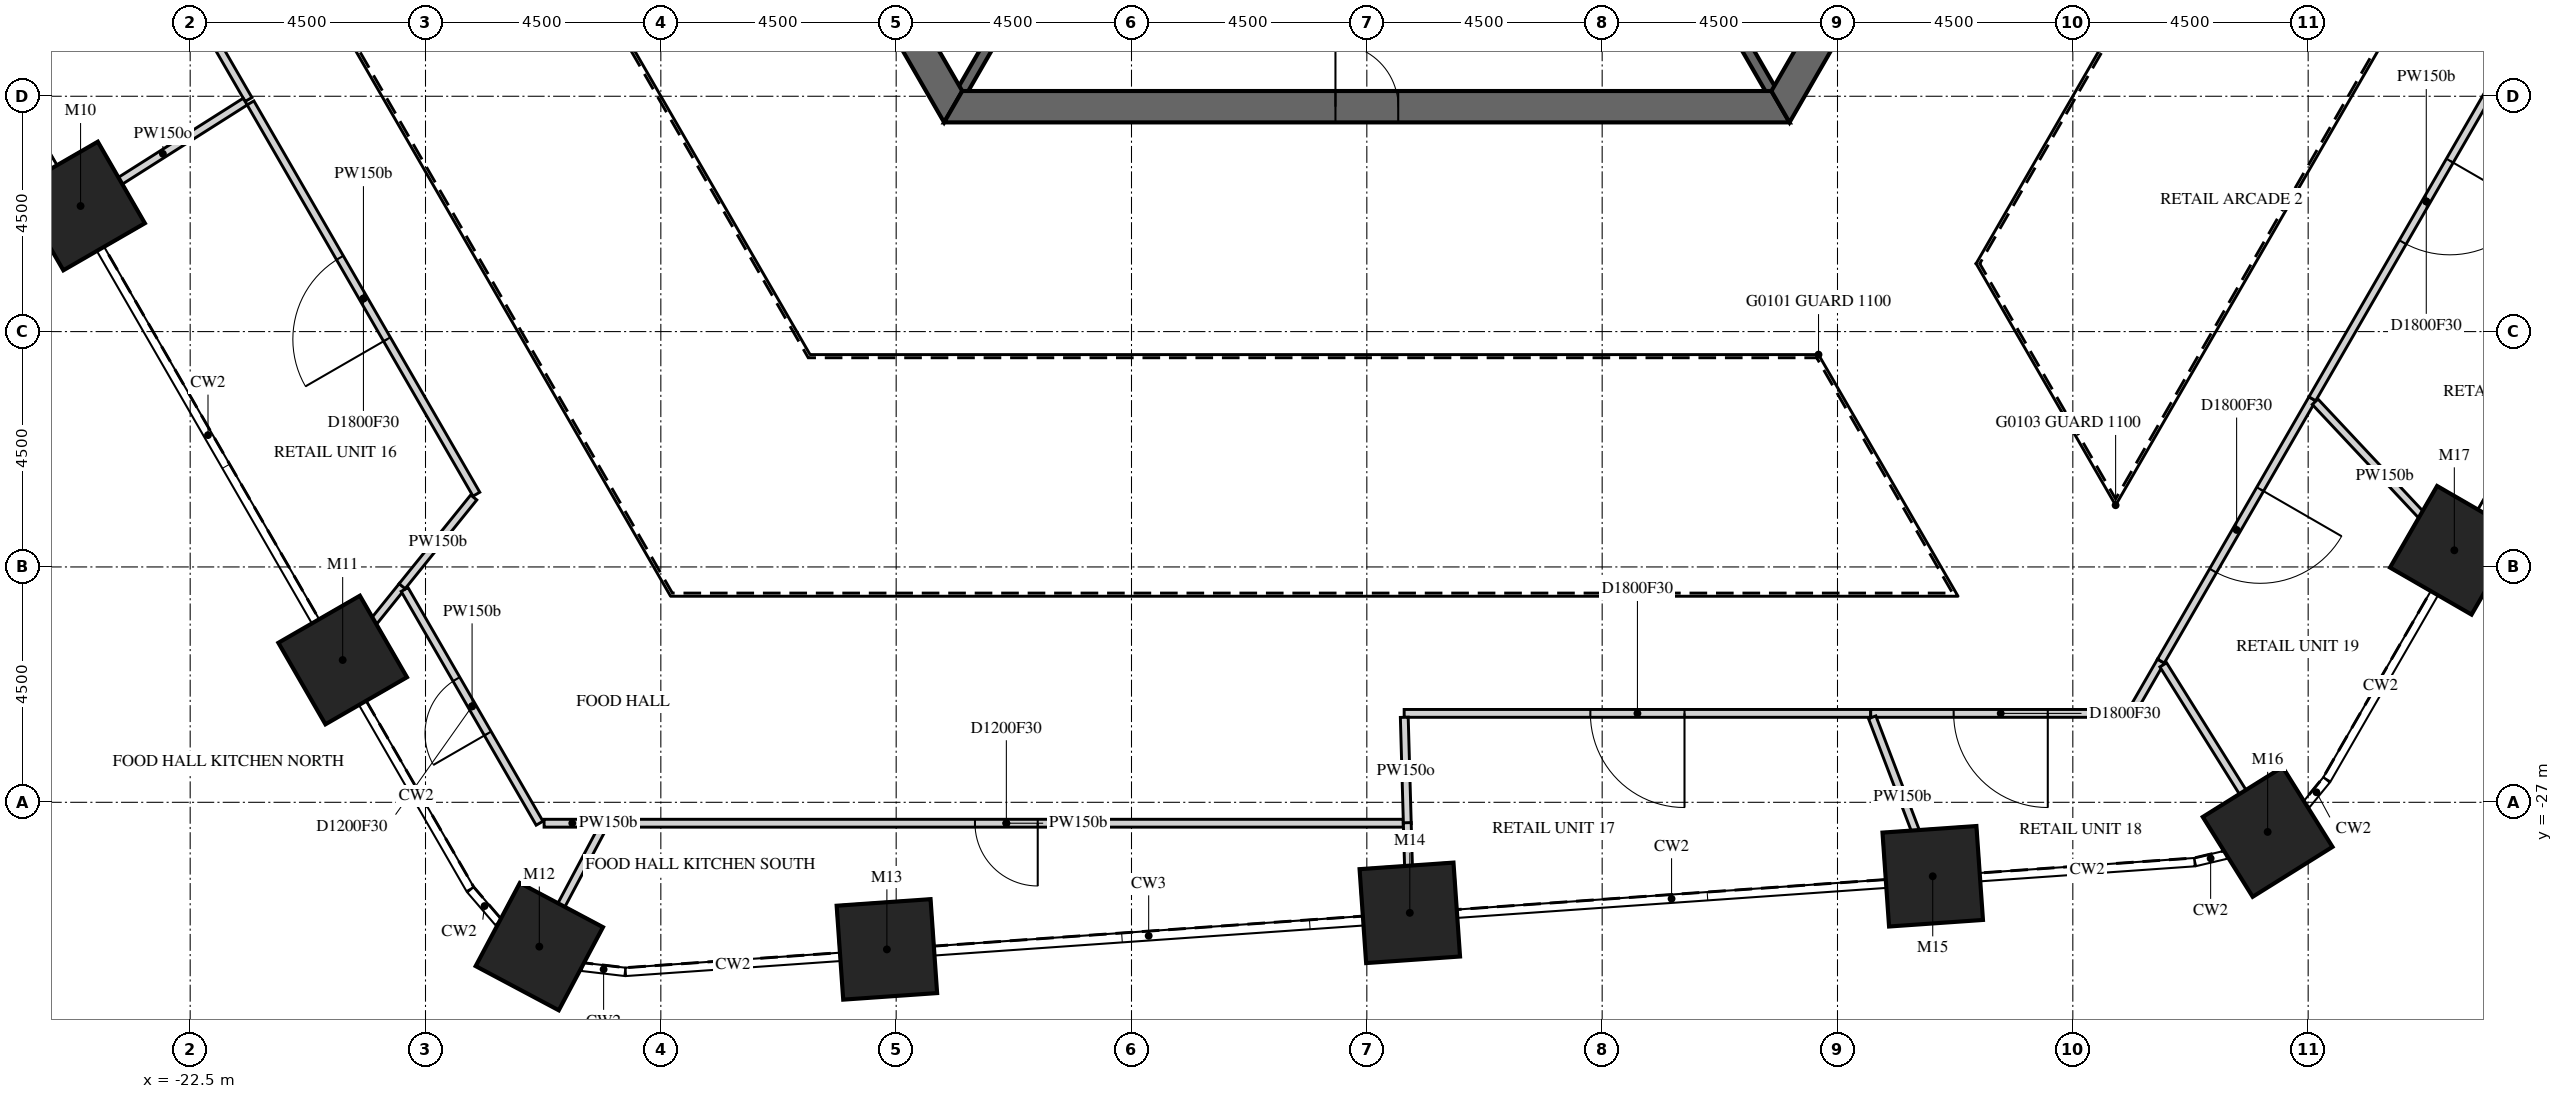
"""IFC4 building model, lengths in metres.
Left out: names, types, materials, properties, quantities, classifications, styles, units other than length and angle.
Written with IfcOpenShell. Run it as: python <this file> out.ifc"""

import sys

from ifc_helpers import new_model, si_unit, direction, frame, frame_2d, origin, origin_2d, place, context, subcontext, project, spatial, polyline, rectangle, outline, extrude, element, fill, save


model = new_model("IFC4")
c1 = context("Model", 3, precision=1e-05, world=origin(), true_north=direction((0.0, 1.0)))
c2 = subcontext(c1, "Body", "Model", "MODEL_VIEW")
j1 = project(units=[si_unit("LENGTHUNIT", "METRE"), si_unit("PLANEANGLEUNIT", "RADIAN")], contexts=[c1])
p1 = place(None, origin())
s1 = spatial("IfcSite", under=j1, at=p1, CompositionType="ELEMENT")
p2 = place(p1, origin())
s2 = spatial("IfcBuilding", under=s1, at=p2, CompositionType="ELEMENT")
p3 = place(p2, frame((0.0, 0.0, 9.0)))
s3 = spatial("IfcBuildingStorey", under=s2, at=p3, CompositionType="ELEMENT", Elevation=9.0)
for number, where, z_axis, x_axis in (
    (1, (-24.596, -15.599, -0.25), (0.0, 0.0, 1.0), (-0.5, 0.866, 0.0)),
    (2, (-19.584, -24.28, -0.25), (0.0, 0.0, 1.0), (-0.5, 0.866, 0.0)),
    (3, (-15.823, -29.76, -0.25), (0.0, 0.0, 1.0), (-0.883, 0.469, 0.0)),
    (4, (-9.177, -29.813, -0.25), (0.0, 0.0, 1.0), (-0.998, -0.07, 0.0)),
    (5, (0.822, -29.114, -0.25), (0.0, 0.0, 1.0), (-0.998, -0.07, 0.0)),
    (6, (10.821, -28.414, -0.25), (0.0, 0.0, 1.0), (-0.998, -0.07, 0.0)),
    (7, (17.225, -27.566, -0.25), (0.0, 0.0, 1.0), (-0.848, -0.53, 0.0)),
    (8, (20.795, -22.182, -0.25), (0.0, 0.0, 1.0), (-0.5, -0.866, 0.0)),
):
    element("IfcColumn", number, at=place(p3, frame(where, z_axis=z_axis, x_axis=x_axis)), inside=s3, PredefinedType="COLUMN", context=c2, shape_type="SweptSolid", body=[
        extrude(rectangle(XDim=1.8, YDim=1.8, at=origin_2d()), origin(), (0.0, 0.0, 1.0), 6.0),
    ])
p4 = place(p3, frame((-15.819, 0.0, -0.25), z_axis=(0.0, 0.0, 1.0), x_axis=(0.499999880136, -0.866025472988, 0.0)))
e9 = element("IfcWall", 9, at=p4, inside=s3, PredefinedType="SHEAR", context=c2, shape_type="SweptSolid", body=[
    extrude(outline(polyline([(-0.173, -0.3), (15.993, -0.3), (15.646, 0.3), (0.173, 0.3), (-0.173, -0.3)])), origin(), (0.0, 0.0, 1.0), 6.0),
])
p5 = place(p4, frame((6.981, 0.0, 0.25)))
e10 = element("IfcOpeningElement", 10, at=p5, cuts=e9, PredefinedType="OPENING", context=c2, shape_type="SweptSolid", body=[
    extrude(rectangle(XDim=1.8, YDim=2.4, at=frame_2d((0.9, 1.2))), frame((0.0, 0.31, 0.0), z_axis=(0.0, -1.0, 0.0), x_axis=(1.0, 0.0, 0.0)), (0.0, 0.0, 1.0), 0.62),
])
p6 = place(p3, frame((-7.91, -13.7, -0.25), z_axis=(0.0, 0.0, 1.0), x_axis=(1.0, 0.0, 0.0)))
e11 = element("IfcWall", 11, at=p6, inside=s3, PredefinedType="SHEAR", context=c2, shape_type="SweptSolid", body=[
    extrude(outline(polyline([(-0.173, -0.3), (15.993, -0.3), (15.646, 0.3), (0.173, 0.3), (-0.173, -0.3)])), origin(), (0.0, 0.0, 1.0), 6.0),
])
p7 = place(p6, frame((7.31, 0.0, 0.25)))
e12 = element("IfcOpeningElement", 12, at=p7, cuts=e11, PredefinedType="OPENING", context=c2, shape_type="SweptSolid", body=[
    extrude(rectangle(XDim=1.2, YDim=2.4, at=frame_2d((0.6, 1.2))), frame((0.0, 0.31, 0.0), z_axis=(0.0, -1.0, 0.0), x_axis=(1.0, 0.0, 0.0)), (0.0, 0.0, 1.0), 0.62),
])
p8 = place(p3, frame((7.91, -13.7, -0.25), z_axis=(0.0, 0.0, 1.0), x_axis=(0.499999880136, 0.866025472988, 0.0)))
e13 = element("IfcWall", 13, at=p8, inside=s3, PredefinedType="SHEAR", context=c2, shape_type="SweptSolid", body=[
    extrude(outline(polyline([(-0.173, -0.3), (15.993, -0.3), (15.646, 0.3), (0.173, 0.3), (-0.173, -0.3)])), origin(), (0.0, 0.0, 1.0), 6.0),
])
p9 = place(p8, frame((7.039, 0.0, 0.25)))
e14 = element("IfcOpeningElement", 14, at=p9, cuts=e13, PredefinedType="OPENING", context=c2, shape_type="SweptSolid", body=[
    extrude(rectangle(XDim=1.8, YDim=2.4, at=frame_2d((0.9, 1.2))), frame((0.0, 0.31, 0.0), z_axis=(0.0, -1.0, 0.0), x_axis=(1.0, 0.0, 0.0)), (0.0, 0.0, 1.0), 0.62),
])
for number, where, z_axis, x_axis in (
    (15, (-5.773, -10.0, -0.25), (0.0, 0.0, 1.0), (-0.5, -0.866, 0.0)),
    (16, (5.773, -10.0, -0.25), (0.0, 0.0, 1.0), (0.5, -0.866, 0.0)),
):
    element("IfcWall", number, at=place(p3, frame(where, z_axis=z_axis, x_axis=x_axis)), inside=s3, PredefinedType="SHEAR", context=c2, shape_type="SweptSolid", body=[
        extrude(rectangle(XDim=3.926, YDim=0.2, at=frame_2d((1.963, 0.0))), origin(), (0.0, 0.0, 1.0), 6.0),
    ])
p10 = place(p3, frame((-21.384, -13.562, 0.0), z_axis=(0.0, 0.0, 1.0), x_axis=(-0.499976136806, 0.866039180768, 0.0)))
e17 = element("IfcWall", 17, at=p10, inside=s3, PredefinedType="PARTITIONING", context=c2, shape_type="SweptSolid", body=[
    extrude(rectangle(XDim=8.636, YDim=0.15, at=frame_2d((4.318, 0.0))), origin(), (0.0, 0.0, 1.0), 5.75),
])
p11 = place(p10, frame((3.418, 0.0, 0.0)))
e18 = element("IfcOpeningElement", 18, at=p11, cuts=e17, PredefinedType="OPENING", context=c2, shape_type="SweptSolid", body=[
    extrude(rectangle(XDim=1.8, YDim=2.1, at=frame_2d((0.9, 1.05))), frame((0.0, 0.085, 0.0), z_axis=(0.0, -1.0, 0.0), x_axis=(1.0, 0.0, 0.0)), (0.0, 0.0, 1.0), 0.17),
])
p12 = place(p3, frame((-24.596, -15.599, 0.0), z_axis=(0.0, 0.0, 1.0), x_axis=(0.84447751604, 0.535591005249, 0.0)))
e19 = element("IfcWall", 19, at=p12, inside=s3, PredefinedType="PARTITIONING", context=c2, shape_type="SweptSolid", body=[
    extrude(rectangle(XDim=3.728, YDim=0.15, at=frame_2d((1.864, 0.0))), origin(), (0.0, 0.0, 1.0), 4.996),
])
p13 = place(p3, frame((-17.027, -21.109, 0.0), z_axis=(0.0, 0.0, 1.0), x_axis=(-0.499968708895, 0.866043468958, 0.0)))
e20 = element("IfcWall", 20, at=p13, inside=s3, PredefinedType="PARTITIONING", context=c2, shape_type="SweptSolid", body=[
    extrude(rectangle(XDim=8.639, YDim=0.15, at=frame_2d((4.32, 0.0))), origin(), (0.0, 0.0, 1.0), 5.75),
])
p14 = place(p13, frame((3.42, 0.0, 0.0)))
e21 = element("IfcOpeningElement", 21, at=p14, cuts=e20, PredefinedType="OPENING", context=c2, shape_type="SweptSolid", body=[
    extrude(rectangle(XDim=1.8, YDim=2.1, at=frame_2d((0.9, 1.05))), frame((0.0, 0.085, 0.0), z_axis=(0.0, -1.0, 0.0), x_axis=(1.0, 0.0, 0.0)), (0.0, 0.0, 1.0), 0.17),
])
p15 = place(p3, frame((-19.584, -24.28, 0.0), z_axis=(0.0, 0.0, 1.0), x_axis=(0.627663432336, 0.778484820474, 0.0)))
e22 = element("IfcWall", 22, at=p15, inside=s3, PredefinedType="PARTITIONING", context=c2, shape_type="SweptSolid", body=[
    extrude(rectangle(XDim=1.823, YDim=0.15, at=frame_2d((0.911, 0.0))), origin(), (0.0, 0.0, 1.0), 5.75),
])
p16 = place(p3, frame((-15.819, -27.4, 0.0), z_axis=(0.0, 0.0, 1.0), x_axis=(-0.500071878781, 0.865983900574, 0.0)))
e23 = element("IfcWall", 23, at=p16, inside=s3, PredefinedType="PARTITIONING", context=c2, shape_type="SweptSolid", body=[
    extrude(rectangle(XDim=5.161, YDim=0.15, at=frame_2d((2.581, 0.0))), origin(), (0.0, 0.0, 1.0), 5.75),
])
p17 = place(p16, frame((1.98, 0.0, 0.0)))
e24 = element("IfcOpeningElement", 24, at=p17, cuts=e23, PredefinedType="OPENING", context=c2, shape_type="SweptSolid", body=[
    extrude(rectangle(XDim=1.2, YDim=2.1, at=frame_2d((0.6, 1.05))), frame((0.0, 0.085, 0.0), z_axis=(0.0, -1.0, 0.0), x_axis=(1.0, 0.0, 0.0)), (0.0, 0.0, 1.0), 0.17),
])
p18 = place(p3, frame((-17.077, -21.172, 0.0), z_axis=(0.0, 0.0, 1.0), x_axis=(-0.627993102959, -0.778218904059, 0.0)))
e25 = element("IfcWall", 25, at=p18, inside=s3, PredefinedType="PARTITIONING", context=c2, shape_type="SweptSolid", body=[
    extrude(rectangle(XDim=2.181, YDim=0.15, at=frame_2d((1.09, 0.0))), origin(), (0.0, 0.0, 1.0), 5.75),
])
p19 = place(p3, frame((-15.824, -29.76, 0.0), z_axis=(0.0, 0.0, 1.0), x_axis=(0.469469065188, 0.882948920851, 0.0)))
e26 = element("IfcWall", 26, at=p19, inside=s3, PredefinedType="PARTITIONING", context=c2, shape_type="SweptSolid", body=[
    extrude(rectangle(XDim=2.673, YDim=0.15, at=frame_2d((1.336, 0.0))), origin(), (0.0, 0.0, 1.0), 4.988),
])
p20 = place(p3, frame((-15.732, -27.4, 0.0), z_axis=(0.0, 0.0, 1.0), x_axis=(1.0, 0.0, 0.0)))
e27 = element("IfcWall", 27, at=p20, inside=s3, PredefinedType="PARTITIONING", context=c2, shape_type="SweptSolid", body=[
    extrude(rectangle(XDim=1.078, YDim=0.15, at=frame_2d((0.539, 0.0))), origin(), (0.0, 0.0, 1.0), 5.75),
])
p21 = place(p3, frame((0.698, -27.4, 0.0), z_axis=(0.0, 0.0, 1.0), x_axis=(-1.0, 0.0, 0.0)))
e28 = element("IfcWall", 28, at=p21, inside=s3, PredefinedType="PARTITIONING", context=c2, shape_type="SweptSolid", body=[
    extrude(rectangle(XDim=15.182, YDim=0.15, at=frame_2d((7.591, 0.0))), origin(), (0.0, 0.0, 1.0), 5.75),
])
p22 = place(p21, frame((6.991, 0.0, 0.0)))
e29 = element("IfcOpeningElement", 29, at=p22, cuts=e28, PredefinedType="OPENING", context=c2, shape_type="SweptSolid", body=[
    extrude(rectangle(XDim=1.2, YDim=2.1, at=frame_2d((0.6, 1.05))), frame((0.0, 0.085, 0.0), z_axis=(0.0, -1.0, 0.0), x_axis=(1.0, 0.0, 0.0)), (0.0, 0.0, 1.0), 0.17),
])
p23 = place(p3, frame((9.635, -25.3, 0.0), z_axis=(0.0, 0.0, 1.0), x_axis=(-1.0, 0.0, 0.0)))
e30 = element("IfcWall", 30, at=p23, inside=s3, PredefinedType="PARTITIONING", context=c2, shape_type="SweptSolid", body=[
    extrude(rectangle(XDim=8.921, YDim=0.15, at=frame_2d((4.46, 0.0))), origin(), (0.0, 0.0, 1.0), 5.75),
])
p24 = place(p23, frame((3.561, 0.0, 0.0)))
e31 = element("IfcOpeningElement", 31, at=p24, cuts=e30, PredefinedType="OPENING", context=c2, shape_type="SweptSolid", body=[
    extrude(rectangle(XDim=1.8, YDim=2.1, at=frame_2d((0.9, 1.05))), frame((0.0, 0.085, 0.0), z_axis=(0.0, -1.0, 0.0), x_axis=(1.0, 0.0, 0.0)), (0.0, 0.0, 1.0), 0.17),
])
p25 = place(p3, frame((0.774, -27.41, 0.0), z_axis=(0.0, 0.0, 1.0), x_axis=(-0.028422825387, 0.999595989886, 0.0)))
e32 = element("IfcWall", 32, at=p25, inside=s3, PredefinedType="PARTITIONING", context=c2, shape_type="SweptSolid", body=[
    extrude(rectangle(XDim=2.036, YDim=0.15, at=frame_2d((1.018, 0.0))), origin(), (0.0, 0.0, 1.0), 4.996),
])
p26 = place(p3, frame((0.822, -29.114, 0.0), z_axis=(0.0, 0.0, 1.0), x_axis=(-0.028450670454, 0.999595197743, 0.0)))
e33 = element("IfcWall", 33, at=p26, inside=s3, PredefinedType="PARTITIONING", context=c2, shape_type="SweptSolid", body=[
    extrude(rectangle(XDim=1.725, YDim=0.15, at=frame_2d((0.862, 0.0))), origin(), (0.0, 0.0, 1.0), 4.996),
])
p27 = place(p3, frame((14.607, -25.3, 0.0), z_axis=(0.0, 0.0, 1.0), x_axis=(-1.0, 0.0, 0.0)))
e34 = element("IfcWall", 34, at=p27, inside=s3, PredefinedType="PARTITIONING", context=c2, shape_type="SweptSolid", body=[
    extrude(rectangle(XDim=4.972, YDim=0.15, at=frame_2d((2.486, 0.0))), origin(), (0.0, 0.0, 1.0), 5.75),
])
p28 = place(p27, frame((1.586, 0.0, 0.0)))
e35 = element("IfcOpeningElement", 35, at=p28, cuts=e34, PredefinedType="OPENING", context=c2, shape_type="SweptSolid", body=[
    extrude(rectangle(XDim=1.8, YDim=2.1, at=frame_2d((0.9, 1.05))), frame((0.0, 0.085, 0.0), z_axis=(0.0, -1.0, 0.0), x_axis=(1.0, 0.0, 0.0)), (0.0, 0.0, 1.0), 0.17),
])
p29 = place(p3, frame((10.821, -28.414, 0.0), z_axis=(0.0, 0.0, 1.0), x_axis=(-0.355923523558, 0.934515085688, 0.0)))
e36 = element("IfcWall", 36, at=p29, inside=s3, PredefinedType="PARTITIONING", context=c2, shape_type="SweptSolid", body=[
    extrude(rectangle(XDim=3.252, YDim=0.15, at=frame_2d((1.626, 0.0))), origin(), (0.0, 0.0, 1.0), 5.75),
])
p30 = place(p3, frame((14.65, -25.225, 0.0), z_axis=(0.0, 0.0, 1.0), x_axis=(0.49972905027, 0.86618178018, 0.0)))
e37 = element("IfcWall", 37, at=p30, inside=s3, PredefinedType="PARTITIONING", context=c2, shape_type="SweptSolid", body=[
    extrude(rectangle(XDim=1.068, YDim=0.15, at=frame_2d((0.534, 0.0))), origin(), (0.0, 0.0, 1.0), 5.75),
])
p31 = place(p3, frame((18.08, -19.285, 0.0), z_axis=(0.0, 0.0, 1.0), x_axis=(-0.500065471556, -0.865987600464, 0.0)))
e38 = element("IfcWall", 38, at=p31, inside=s3, PredefinedType="PARTITIONING", context=c2, shape_type="SweptSolid", body=[
    extrude(rectangle(XDim=5.791, YDim=0.15, at=frame_2d((2.896, 0.0))), origin(), (0.0, 0.0, 1.0), 5.75),
])
p32 = place(p31, frame((1.996, 0.0, 0.0)))
e39 = element("IfcOpeningElement", 39, at=p32, cuts=e38, PredefinedType="OPENING", context=c2, shape_type="SweptSolid", body=[
    extrude(rectangle(XDim=1.8, YDim=2.1, at=frame_2d((0.9, 1.05))), frame((0.0, 0.085, 0.0), z_axis=(0.0, -1.0, 0.0), x_axis=(1.0, 0.0, 0.0)), (0.0, 0.0, 1.0), 0.17),
])
p33 = place(p3, frame((17.225, -27.566, 0.0), z_axis=(0.0, 0.0, 1.0), x_axis=(-0.529987286502, 0.848005587332, 0.0)))
e40 = element("IfcWall", 40, at=p33, inside=s3, PredefinedType="PARTITIONING", context=c2, shape_type="SweptSolid", body=[
    extrude(rectangle(XDim=3.766, YDim=0.15, at=frame_2d((1.883, 0.0))), origin(), (0.0, 0.0, 1.0), 4.988),
])
p34 = place(p3, frame((22.437, -11.738, 0.0), z_axis=(0.0, 0.0, 1.0), x_axis=(-0.499977905081, -0.866038159916, 0.0)))
e41 = element("IfcWall", 41, at=p34, inside=s3, PredefinedType="PARTITIONING", context=c2, shape_type="SweptSolid", body=[
    extrude(rectangle(XDim=8.714, YDim=0.15, at=frame_2d((4.357, 0.0))), origin(), (0.0, 0.0, 1.0), 5.75),
])
p35 = place(p34, frame((3.457, 0.0, 0.0)))
e42 = element("IfcOpeningElement", 42, at=p35, cuts=e41, PredefinedType="OPENING", context=c2, shape_type="SweptSolid", body=[
    extrude(rectangle(XDim=1.8, YDim=2.1, at=frame_2d((0.9, 1.05))), frame((0.0, 0.085, 0.0), z_axis=(0.0, -1.0, 0.0), x_axis=(1.0, 0.0, 0.0)), (0.0, 0.0, 1.0), 0.17),
])
p36 = place(p3, frame((20.795, -22.182, 0.0), z_axis=(0.0, 0.0, 1.0), x_axis=(-0.683838873314, 0.729633055271, 0.0)))
e43 = element("IfcWall", 43, at=p36, inside=s3, PredefinedType="PARTITIONING", context=c2, shape_type="SweptSolid", body=[
    extrude(rectangle(XDim=3.892, YDim=0.15, at=frame_2d((1.946, 0.0))), origin(), (0.0, 0.0, 1.0), 5.75),
])
p37 = place(p7, origin())
e44 = element("IfcDoor", 44, at=p37, inside=s3, OperationType="SINGLE_SWING_LEFT", PredefinedType="DOOR", context=c2, shape_type="SweptSolid", body=[
    extrude(rectangle(XDim=1.2, YDim=2.4, at=frame_2d((0.6, 1.2))), frame((0.0, 0.025, 0.0), z_axis=(0.0, -1.0, 0.0), x_axis=(1.0, 0.0, 0.0)), (0.0, 0.0, 1.0), 0.05),
])
fill(e12, e44)
p38 = place(p14, origin())
e45 = element("IfcDoor", 45, at=p38, inside=s3, OperationType="DOUBLE_DOOR_SINGLE_SWING", PredefinedType="DOOR", context=c2, shape_type="SweptSolid", body=[
    extrude(rectangle(XDim=1.8, YDim=2.1, at=frame_2d((0.9, 1.05))), frame((0.0, 0.025, 0.0), z_axis=(0.0, -1.0, 0.0), x_axis=(1.0, 0.0, 0.0)), (0.0, 0.0, 1.0), 0.05),
])
fill(e21, e45)
p39 = place(p17, origin())
e46 = element("IfcDoor", 46, at=p39, inside=s3, OperationType="SINGLE_SWING_RIGHT", PredefinedType="DOOR", context=c2, shape_type="SweptSolid", body=[
    extrude(rectangle(XDim=1.2, YDim=2.1, at=frame_2d((0.6, 1.05))), frame((0.0, 0.025, 0.0), z_axis=(0.0, -1.0, 0.0), x_axis=(1.0, 0.0, 0.0)), (0.0, 0.0, 1.0), 0.05),
])
fill(e24, e46)
p40 = place(p22, origin())
e47 = element("IfcDoor", 47, at=p40, inside=s3, OperationType="SINGLE_SWING_LEFT", PredefinedType="DOOR", context=c2, shape_type="SweptSolid", body=[
    extrude(rectangle(XDim=1.2, YDim=2.1, at=frame_2d((0.6, 1.05))), frame((0.0, 0.025, 0.0), z_axis=(0.0, -1.0, 0.0), x_axis=(1.0, 0.0, 0.0)), (0.0, 0.0, 1.0), 0.05),
])
fill(e29, e47)
p41 = place(p24, origin())
e48 = element("IfcDoor", 48, at=p41, inside=s3, OperationType="DOUBLE_DOOR_SINGLE_SWING", PredefinedType="DOOR", context=c2, shape_type="SweptSolid", body=[
    extrude(rectangle(XDim=1.8, YDim=2.1, at=frame_2d((0.9, 1.05))), frame((0.0, 0.025, 0.0), z_axis=(0.0, -1.0, 0.0), x_axis=(1.0, 0.0, 0.0)), (0.0, 0.0, 1.0), 0.05),
])
fill(e31, e48)
p42 = place(p28, origin())
e49 = element("IfcDoor", 49, at=p42, inside=s3, OperationType="DOUBLE_DOOR_SINGLE_SWING", PredefinedType="DOOR", context=c2, shape_type="SweptSolid", body=[
    extrude(rectangle(XDim=1.8, YDim=2.1, at=frame_2d((0.9, 1.05))), frame((0.0, 0.025, 0.0), z_axis=(0.0, -1.0, 0.0), x_axis=(1.0, 0.0, 0.0)), (0.0, 0.0, 1.0), 0.05),
])
fill(e35, e49)
p43 = place(p32, origin())
e50 = element("IfcDoor", 50, at=p43, inside=s3, OperationType="DOUBLE_DOOR_SINGLE_SWING", PredefinedType="DOOR", context=c2, shape_type="SweptSolid", body=[
    extrude(rectangle(XDim=1.8, YDim=2.1, at=frame_2d((0.9, 1.05))), frame((0.0, 0.025, 0.0), z_axis=(0.0, -1.0, 0.0), x_axis=(1.0, 0.0, 0.0)), (0.0, 0.0, 1.0), 0.05),
])
fill(e39, e50)
p44 = place(p35, origin())
e51 = element("IfcDoor", 51, at=p44, inside=s3, OperationType="DOUBLE_DOOR_SINGLE_SWING", PredefinedType="DOOR", context=c2, shape_type="SweptSolid", body=[
    extrude(rectangle(XDim=1.8, YDim=2.1, at=frame_2d((0.9, 1.05))), frame((0.0, 0.025, 0.0), z_axis=(0.0, -1.0, 0.0), x_axis=(1.0, 0.0, 0.0)), (0.0, 0.0, 1.0), 0.05),
])
fill(e42, e51)
save(model, sys.argv[1])
